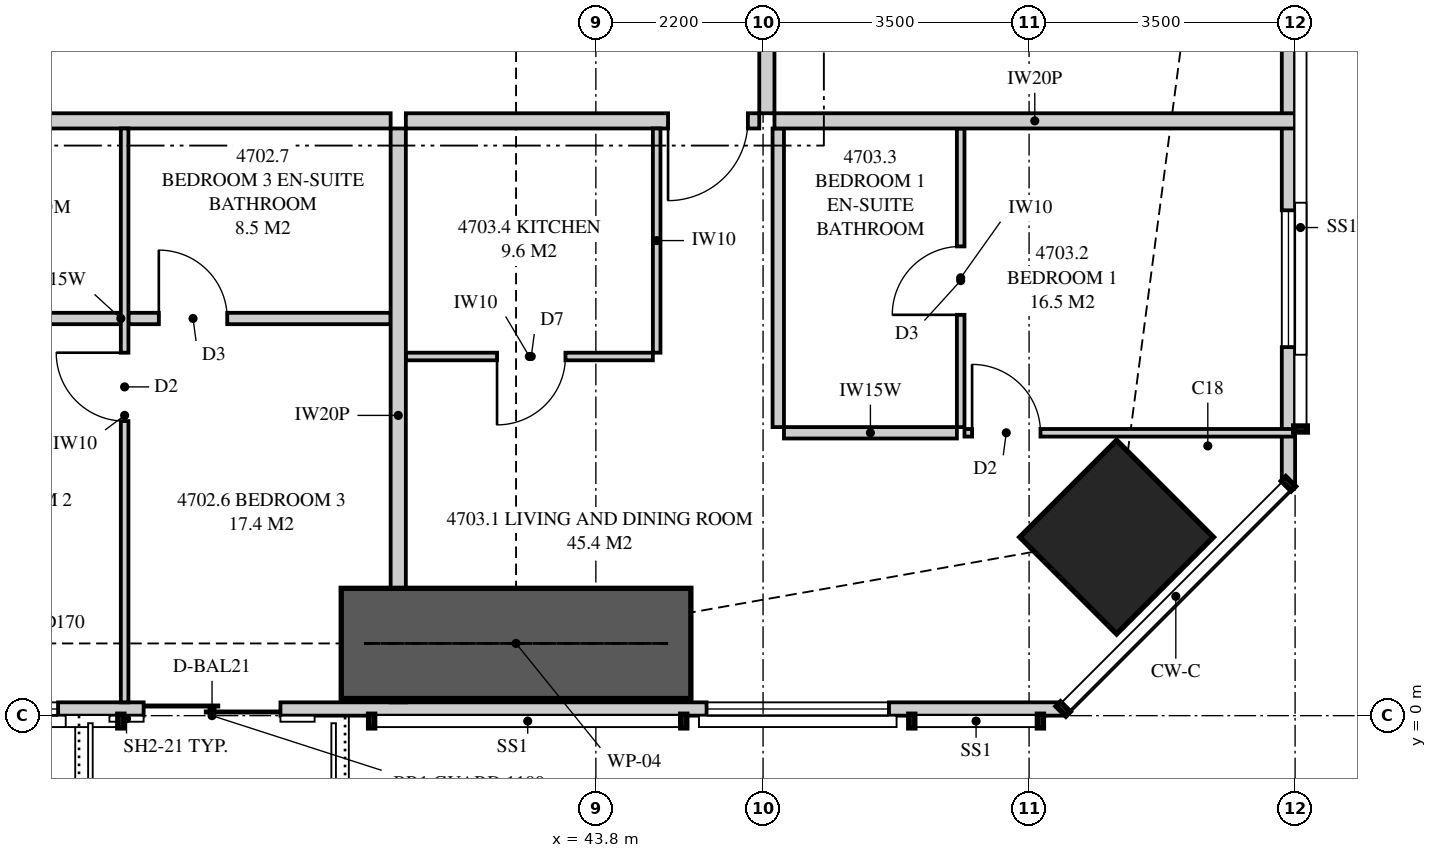
"""IFC4 building model, lengths in metres.
Left out: names, types, materials, properties, quantities, classifications, styles, units other than length and angle.
Written with IfcOpenShell. Run it as: python <this file> out.ifc"""

import sys

from ifc_helpers import new_model, si_unit, direction, frame, frame_2d, origin, origin_2d, place, context, subcontext, project, spatial, polyline, rectangle, outline, extrude, element, fill, save


model = new_model("IFC4")
c1 = context("Model", 3, precision=1e-05, world=origin(), true_north=direction((0.0, 1.0)))
c2 = subcontext(c1, "Body", "Model", "MODEL_VIEW")
j1 = project(units=[si_unit("LENGTHUNIT", "METRE"), si_unit("PLANEANGLEUNIT", "RADIAN")], contexts=[c1])
p1 = place(None, origin())
s1 = spatial("IfcSite", under=j1, at=p1, CompositionType="ELEMENT")
p2 = place(p1, origin())
s2 = spatial("IfcBuilding", under=s1, at=p2, CompositionType="ELEMENT")
p3 = place(p2, frame((0.0, 0.0, 174.45)))
s3 = spatial("IfcBuildingStorey", under=s2, at=p3, CompositionType="ELEMENT", Elevation=174.45)
p4 = place(p3, frame((50.652, 2.348, 0.0), z_axis=(0.0, 0.0, 1.0), x_axis=(0.707106781187, 0.707106781187, 0.0)))
e1 = element("IfcColumn", 1, at=p4, inside=s3, PredefinedType="COLUMN", context=c2, shape_type="SweptSolid", body=[
    extrude(rectangle(XDim=1.8, YDim=1.8, at=origin_2d()), origin(), (0.0, 0.0, 1.0), 3.35),
])
p5 = place(p3, frame((15.051, 0.087, 0.0), z_axis=(0.0, 0.0, 1.0), x_axis=(1.0, 0.0, 0.0)))
e2 = element("IfcWall", 2, at=p5, inside=s3, PredefinedType="SOLIDWALL", context=c2, shape_type="SweptSolid", body=[
    extrude(outline(polyline([(0.0, 0.0), (34.897, 0.0), (34.897, 3.11), (27.91, 3.11), (27.91, 2.15), (27.836, 2.15), (27.836, 3.11), (27.699, 3.11), (27.699, 2.15), (7.199, 2.15), (7.199, 3.11), (7.062, 3.11), (7.062, 2.15), (6.987, 2.15), (6.987, 3.11), (0.0, 3.11), (0.0, 0.0)])), frame((0.0, 0.087, 0.0), z_axis=(0.0, -1.0, 0.0), x_axis=(1.0, 0.0, 0.0)), (0.0, 0.0, 1.0), 0.175),
])
p6 = place(p5, frame((2.31, 0.0, 0.4)))
e3 = element("IfcOpeningElement", 3, at=p6, cuts=e2, PredefinedType="OPENING", context=c2, shape_type="SweptSolid", body=[
    extrude(rectangle(XDim=2.4, YDim=1.7, at=frame_2d((1.2, 0.85))), frame((0.0, 0.097, 0.0), z_axis=(0.0, -1.0, 0.0), x_axis=(1.0, 0.0, 0.0)), (0.0, 0.0, 1.0), 0.195),
])
p7 = place(p5, frame((10.399, 0.0, 0.0)))
e4 = element("IfcOpeningElement", 4, at=p7, cuts=e2, PredefinedType="OPENING", context=c2, shape_type="SweptSolid", body=[
    extrude(rectangle(XDim=1.8, YDim=2.1, at=frame_2d((0.9, 1.05))), frame((0.0, 0.097, 0.0), z_axis=(0.0, -1.0, 0.0), x_axis=(1.0, 0.0, 0.0)), (0.0, 0.0, 1.0), 0.195),
])
p8 = place(p5, frame((12.649, 0.0, 0.4)))
e5 = element("IfcOpeningElement", 5, at=p8, cuts=e2, PredefinedType="OPENING", context=c2, shape_type="SweptSolid", body=[
    extrude(rectangle(XDim=2.4, YDim=1.7, at=frame_2d((1.2, 0.85))), frame((0.0, 0.097, 0.0), z_axis=(0.0, -1.0, 0.0), x_axis=(1.0, 0.0, 0.0)), (0.0, 0.0, 1.0), 0.195),
])
p9 = place(p5, frame((19.874, 0.0, 0.4)))
e6 = element("IfcOpeningElement", 6, at=p9, cuts=e2, PredefinedType="OPENING", context=c2, shape_type="SweptSolid", body=[
    extrude(rectangle(XDim=1.8, YDim=1.7, at=frame_2d((0.9, 0.85))), frame((0.0, 0.097, 0.0), z_axis=(0.0, -1.0, 0.0), x_axis=(1.0, 0.0, 0.0)), (0.0, 0.0, 1.0), 0.195),
])
p10 = place(p5, frame((22.799, 0.0, 0.0)))
e7 = element("IfcOpeningElement", 7, at=p10, cuts=e2, PredefinedType="OPENING", context=c2, shape_type="SweptSolid", body=[
    extrude(rectangle(XDim=1.8, YDim=2.1, at=frame_2d((0.9, 1.05))), frame((0.0, 0.097, 0.0), z_axis=(0.0, -1.0, 0.0), x_axis=(1.0, 0.0, 0.0)), (0.0, 0.0, 1.0), 0.195),
])
p11 = place(p5, frame((30.205, 0.0, 0.4)))
e8 = element("IfcOpeningElement", 8, at=p11, cuts=e2, PredefinedType="OPENING", context=c2, shape_type="SweptSolid", body=[
    extrude(rectangle(XDim=2.4, YDim=1.7, at=frame_2d((1.2, 0.85))), frame((0.0, 0.097, 0.0), z_axis=(0.0, -1.0, 0.0), x_axis=(1.0, 0.0, 0.0)), (0.0, 0.0, 1.0), 0.195),
])
p12 = place(p3, frame((52.913, 3.051, 0.0), z_axis=(0.0, 0.0, 1.0), x_axis=(0.0, 1.0, 0.0)))
e9 = element("IfcWall", 9, at=p12, inside=s3, PredefinedType="SOLIDWALL", context=c2, shape_type="SweptSolid", body=[
    extrude(outline(polyline([(0.0, 0.0), (29.897, 0.0), (29.897, 3.11), (22.167, 3.11), (22.167, 2.15), (22.074, 2.15), (22.074, 3.11), (21.949, 3.11), (21.949, 2.15), (9.949, 2.15), (9.949, 3.11), (9.847, 3.11), (9.847, 2.15), (9.706, 2.15), (9.706, 3.11), (0.0, 3.11), (0.0, 0.0)])), frame((0.0, 0.087, 0.0), z_axis=(0.0, -1.0, 0.0), x_axis=(1.0, 0.0, 0.0)), (0.0, 0.0, 1.0), 0.175),
])
p13 = place(p12, frame((1.797, 0.0, 0.4)))
e10 = element("IfcOpeningElement", 10, at=p13, cuts=e9, PredefinedType="OPENING", context=c2, shape_type="SweptSolid", body=[
    extrude(rectangle(XDim=1.8, YDim=1.7, at=frame_2d((0.9, 0.85))), frame((0.0, 0.097, 0.0), z_axis=(0.0, -1.0, 0.0), x_axis=(1.0, 0.0, 0.0)), (0.0, 0.0, 1.0), 0.195),
])
p14 = place(p12, frame((6.321, 0.0, 0.4)))
e11 = element("IfcOpeningElement", 11, at=p14, cuts=e9, PredefinedType="OPENING", context=c2, shape_type="SweptSolid", body=[
    extrude(rectangle(XDim=1.2, YDim=1.7, at=frame_2d((0.6, 0.85))), frame((0.0, 0.097, 0.0), z_axis=(0.0, -1.0, 0.0), x_axis=(1.0, 0.0, 0.0)), (0.0, 0.0, 1.0), 0.195),
])
p15 = place(p12, frame((12.424, 0.0, 0.4)))
e12 = element("IfcOpeningElement", 12, at=p15, cuts=e9, PredefinedType="OPENING", context=c2, shape_type="SweptSolid", body=[
    extrude(rectangle(XDim=1.8, YDim=1.7, at=frame_2d((0.9, 0.85))), frame((0.0, 0.097, 0.0), z_axis=(0.0, -1.0, 0.0), x_axis=(1.0, 0.0, 0.0)), (0.0, 0.0, 1.0), 0.195),
])
p16 = place(p12, frame((15.274, 0.0, 0.0)))
e13 = element("IfcOpeningElement", 13, at=p16, cuts=e9, PredefinedType="OPENING", context=c2, shape_type="SweptSolid", body=[
    extrude(rectangle(XDim=1.8, YDim=2.1, at=frame_2d((0.9, 1.05))), frame((0.0, 0.097, 0.0), z_axis=(0.0, -1.0, 0.0), x_axis=(1.0, 0.0, 0.0)), (0.0, 0.0, 1.0), 0.195),
])
p17 = place(p12, frame((17.736, 0.0, 0.4)))
e14 = element("IfcOpeningElement", 14, at=p17, cuts=e9, PredefinedType="OPENING", context=c2, shape_type="SweptSolid", body=[
    extrude(rectangle(XDim=1.8, YDim=1.7, at=frame_2d((0.9, 0.85))), frame((0.0, 0.097, 0.0), z_axis=(0.0, -1.0, 0.0), x_axis=(1.0, 0.0, 0.0)), (0.0, 0.0, 1.0), 0.195),
])
p18 = place(p12, frame((24.373, 0.0, 0.4)))
e15 = element("IfcOpeningElement", 15, at=p18, cuts=e9, PredefinedType="OPENING", context=c2, shape_type="SweptSolid", body=[
    extrude(rectangle(XDim=1.2, YDim=1.7, at=frame_2d((0.6, 0.85))), frame((0.0, 0.097, 0.0), z_axis=(0.0, -1.0, 0.0), x_axis=(1.0, 0.0, 0.0)), (0.0, 0.0, 1.0), 0.195),
])
p19 = place(p12, frame((26.861, 0.0, 0.4)))
e16 = element("IfcOpeningElement", 16, at=p19, cuts=e9, PredefinedType="OPENING", context=c2, shape_type="SweptSolid", body=[
    extrude(rectangle(XDim=2.4, YDim=1.7, at=frame_2d((1.2, 0.85))), frame((0.0, 0.097, 0.0), z_axis=(0.0, -1.0, 0.0), x_axis=(1.0, 0.0, 0.0)), (0.0, 0.0, 1.0), 0.195),
])
p20 = place(p3, frame((41.2, 0.175, 0.0), z_axis=(0.0, 0.0, 1.0), x_axis=(0.0, 1.0, 0.0)))
e17 = element("IfcWall", 17, at=p20, inside=s3, PredefinedType="PARTITIONING", context=c2, shape_type="SweptSolid", body=[
    extrude(outline(polyline([(0.529, 2.15), (0.0, 2.15), (0.0, 0.0), (0.529, 0.0), (0.529, 0.248), (1.021, 0.248), (1.021, 0.0), (7.55, 0.0), (7.55, 3.11), (1.685, 3.11), (1.685, 2.15), (1.021, 2.15), (1.021, 1.902), (0.529, 1.902), (0.529, 2.15)])), frame((0.0, 0.1, 0.0), z_axis=(0.0, -1.0, 0.0), x_axis=(1.0, 0.0, 0.0)), (0.0, 0.0, 1.0), 0.2),
])
p21 = place(p3, frame((37.6, 0.175, 0.0), z_axis=(0.0, 0.0, 1.0), x_axis=(0.0, 1.0, 0.0)))
e18 = element("IfcWall", 18, at=p21, inside=s3, PredefinedType="PARTITIONING", context=c2, shape_type="SweptSolid", body=[
    extrude(outline(polyline([(0.0, 0.0), (7.55, 0.0), (7.55, 3.11), (1.635, 3.11), (1.635, 2.15), (0.0, 2.15), (0.0, 3.11), (0.0, 0.0)])), frame((0.0, 0.05, 0.0), z_axis=(0.0, -1.0, 0.0), x_axis=(1.0, 0.0, 0.0)), (0.0, 0.0, 1.0), 0.1),
])
p22 = place(p21, frame((3.7, 0.0, 0.0)))
e19 = element("IfcOpeningElement", 19, at=p22, cuts=e18, PredefinedType="OPENING", context=c2, shape_type="SweptSolid", body=[
    extrude(rectangle(XDim=0.9, YDim=2.1, at=frame_2d((0.45, 1.05))), frame((0.0, 0.06, 0.0), z_axis=(0.0, -1.0, 0.0), x_axis=(1.0, 0.0, 0.0)), (0.0, 0.0, 1.0), 0.12),
])
p23 = place(p3, frame((34.05, 5.225, 0.0), z_axis=(0.0, 0.0, 1.0), x_axis=(1.0, 0.0, 0.0)))
e20 = element("IfcWall", 20, at=p23, inside=s3, PredefinedType="PLUMBINGWALL", context=c2, shape_type="SweptSolid", body=[
    extrude(rectangle(XDim=3.5, YDim=0.15, at=frame_2d((1.75, 0.0))), origin(), (0.0, 0.0, 1.0), 3.11),
])
p24 = place(p3, frame((37.65, 5.225, 0.0), z_axis=(0.0, 0.0, 1.0), x_axis=(1.0, 0.0, 0.0)))
e21 = element("IfcWall", 21, at=p24, inside=s3, PredefinedType="PLUMBINGWALL", context=c2, shape_type="SweptSolid", body=[
    extrude(rectangle(XDim=3.45, YDim=0.15, at=frame_2d((1.725, 0.0))), origin(), (0.0, 0.0, 1.0), 3.11),
])
p25 = place(p24, frame((0.4, 0.0, 0.0)))
e22 = element("IfcOpeningElement", 22, at=p25, cuts=e21, PredefinedType="OPENING", context=c2, shape_type="SweptSolid", body=[
    extrude(rectangle(XDim=0.9, YDim=2.1, at=frame_2d((0.45, 1.05))), frame((0.0, 0.085, 0.0), z_axis=(0.0, -1.0, 0.0), x_axis=(1.0, 0.0, 0.0)), (0.0, 0.0, 1.0), 0.17),
])
p26 = place(p3, frame((41.3, 7.825, 0.0), z_axis=(0.0, 0.0, 1.0), x_axis=(1.0, 0.0, 0.0)))
e23 = element("IfcWall", 23, at=p26, inside=s3, PredefinedType="PARTITIONING", context=c2, shape_type="SweptSolid", body=[
    extrude(outline(polyline([(0.0, 0.0), (4.65, 0.0), (4.65, 3.11), (1.787, 3.11), (1.787, 2.541), (1.113, 2.541), (1.113, 3.11), (0.0, 3.11), (0.0, 0.0)])), frame((0.0, 0.1, 0.0), z_axis=(0.0, -1.0, 0.0), x_axis=(1.0, 0.0, 0.0)), (0.0, 0.0, 1.0), 0.2),
])
p27 = place(p26, frame((3.45, 0.0, 0.0)))
e24 = element("IfcOpeningElement", 24, at=p27, cuts=e23, PredefinedType="OPENING", context=c2, shape_type="SweptSolid", body=[
    extrude(rectangle(XDim=1.05, YDim=2.2, at=frame_2d((0.525, 1.1))), frame((0.0, 0.11, 0.0), z_axis=(0.0, -1.0, 0.0), x_axis=(1.0, 0.0, 0.0)), (0.0, 0.0, 1.0), 0.22),
])
p28 = place(p3, frame((48.6, 3.796, 0.0), z_axis=(0.0, 0.0, 1.0), x_axis=(0.0, 1.0, 0.0)))
e25 = element("IfcWall", 25, at=p28, inside=s3, PredefinedType="PARTITIONING", context=c2, shape_type="SweptSolid", body=[
    extrude(rectangle(XDim=3.929, YDim=0.1, at=frame_2d((1.964, 0.0))), origin(), (0.0, 0.0, 1.0), 3.11),
])
p29 = place(p28, frame((1.477, 0.0, 0.0)))
e26 = element("IfcOpeningElement", 26, at=p29, cuts=e25, PredefinedType="OPENING", context=c2, shape_type="SweptSolid", body=[
    extrude(rectangle(XDim=0.9, YDim=2.1, at=frame_2d((0.45, 1.05))), frame((0.0, 0.06, 0.0), z_axis=(0.0, -1.0, 0.0), x_axis=(1.0, 0.0, 0.0)), (0.0, 0.0, 1.0), 0.12),
])
p30 = place(p3, frame((48.65, 3.721, 0.0), z_axis=(0.0, 0.0, 1.0), x_axis=(1.0, 0.0, 0.0)))
e27 = element("IfcWall", 27, at=p30, inside=s3, PredefinedType="PARTITIONING", context=c2, shape_type="SweptSolid", body=[
    extrude(outline(polyline([(0.0, 0.0), (4.35, 0.0), (4.35, 3.11), (3.049, 3.11), (3.049, 2.15), (1.314, 2.15), (1.314, 3.11), (0.0, 3.11), (0.0, 0.0)])), frame((0.0, 0.05, 0.0), z_axis=(0.0, -1.0, 0.0), x_axis=(1.0, 0.0, 0.0)), (0.0, 0.0, 1.0), 0.1),
])
p31 = place(p30, frame((0.1, 0.0, 0.0)))
e28 = element("IfcOpeningElement", 28, at=p31, cuts=e27, PredefinedType="OPENING", context=c2, shape_type="SweptSolid", body=[
    extrude(rectangle(XDim=0.9, YDim=2.1, at=frame_2d((0.45, 1.05))), frame((0.0, 0.06, 0.0), z_axis=(0.0, -1.0, 0.0), x_axis=(1.0, 0.0, 0.0)), (0.0, 0.0, 1.0), 0.12),
])
p32 = place(p3, frame((46.275, 3.721, 0.0), z_axis=(0.0, 0.0, 1.0), x_axis=(1.0, 0.0, 0.0)))
e29 = element("IfcWall", 29, at=p32, inside=s3, PredefinedType="PLUMBINGWALL", context=c2, shape_type="SweptSolid", body=[
    extrude(rectangle(XDim=2.275, YDim=0.15, at=frame_2d((1.138, 0.0))), origin(), (0.0, 0.0, 1.0), 3.11),
])
p33 = place(p3, frame((46.2, 3.796, 0.0), z_axis=(0.0, 0.0, 1.0), x_axis=(0.0, 1.0, 0.0)))
e30 = element("IfcWall", 30, at=p33, inside=s3, PredefinedType="PLUMBINGWALL", context=c2, shape_type="SweptSolid", body=[
    extrude(rectangle(XDim=3.929, YDim=0.15, at=frame_2d((1.964, 0.0))), origin(), (0.0, 0.0, 1.0), 3.11),
])
p34 = place(p3, frame((41.3, 4.725, 0.0), z_axis=(0.0, 0.0, 1.0), x_axis=(1.0, 0.0, 0.0)))
e31 = element("IfcWall", 31, at=p34, inside=s3, PredefinedType="PARTITIONING", context=c2, shape_type="SweptSolid", body=[
    extrude(outline(polyline([(0.0, 0.0), (3.25, 0.0), (3.25, 3.11), (1.737, 3.11), (1.737, 2.541), (1.163, 2.541), (1.163, 3.11), (0.0, 3.11), (0.0, 0.0)])), frame((0.0, 0.05, 0.0), z_axis=(0.0, -1.0, 0.0), x_axis=(1.0, 0.0, 0.0)), (0.0, 0.0, 1.0), 0.1),
])
p35 = place(p34, frame((1.2, 0.0, 0.0)))
e32 = element("IfcOpeningElement", 32, at=p35, cuts=e31, PredefinedType="OPENING", context=c2, shape_type="SweptSolid", body=[
    extrude(rectangle(XDim=0.9, YDim=2.1, at=frame_2d((0.45, 1.05))), frame((0.0, 0.06, 0.0), z_axis=(0.0, -1.0, 0.0), x_axis=(1.0, 0.0, 0.0)), (0.0, 0.0, 1.0), 0.12),
])
p36 = place(p3, frame((44.6, 4.775, 0.0), z_axis=(0.0, 0.0, 1.0), x_axis=(0.0, 1.0, 0.0)))
e33 = element("IfcWall", 33, at=p36, inside=s3, PredefinedType="PARTITIONING", context=c2, shape_type="SweptSolid", body=[
    extrude(rectangle(XDim=2.95, YDim=0.1, at=frame_2d((1.475, 0.0))), origin(), (0.0, 0.0, 1.0), 3.11),
])
p37 = place(p3, frame((46.15, 7.825, 0.0), z_axis=(0.0, 0.0, 1.0), x_axis=(1.0, 0.0, 0.0)))
e34 = element("IfcWall", 34, at=p37, inside=s3, PredefinedType="PARTITIONING", context=c2, shape_type="SweptSolid", body=[
    extrude(outline(polyline([(0.0, 0.0), (6.85, 0.0), (6.85, 3.11), (6.138, 3.11), (6.138, 2.15), (4.303, 2.15), (4.303, 3.11), (0.0, 3.11), (0.0, 0.0)])), frame((0.0, 0.1, 0.0), z_axis=(0.0, -1.0, 0.0), x_axis=(1.0, 0.0, 0.0)), (0.0, 0.0, 1.0), 0.2),
])
p38 = place(p3, frame((46.05, 7.925, 0.0), z_axis=(0.0, 0.0, 1.0), x_axis=(0.0, 1.0, 0.0)))
e35 = element("IfcWall", 35, at=p38, inside=s3, PredefinedType="PARTITIONING", context=c2, shape_type="SweptSolid", body=[
    extrude(rectangle(XDim=1.188, YDim=0.2, at=frame_2d((0.594, 0.0))), origin(), (0.0, 0.0, 1.0), 3.11),
])
p39 = place(p3, frame((33.725, 7.825, 0.0), z_axis=(0.0, 0.0, 1.0), x_axis=(1.0, 0.0, 0.0)))
e36 = element("IfcWall", 36, at=p39, inside=s3, PredefinedType="PARTITIONING", context=c2, shape_type="SweptSolid", body=[
    extrude(rectangle(XDim=7.375, YDim=0.2, at=frame_2d((3.688, 0.0))), origin(), (0.0, 0.0, 1.0), 3.11),
])
p40 = place(p3, frame((40.45, 0.95, 0.0), z_axis=(0.0, 0.0, 1.0), x_axis=(1.0, 0.0, 0.0)))
e37 = element("IfcWall", 37, at=p40, inside=s3, PredefinedType="SHEAR", context=c2, shape_type="SweptSolid", body=[
    extrude(rectangle(XDim=4.6, YDim=1.45, at=frame_2d((2.3, 0.0))), origin(), (0.0, 0.0, 1.0), 3.35),
])
p41 = place(p9, origin())
e38 = element("IfcWindow", 38, at=p41, inside=s3, PartitioningType="SINGLE_PANEL", PredefinedType="WINDOW", context=c2, shape_type="SweptSolid", body=[
    extrude(rectangle(XDim=1.8, YDim=1.7, at=frame_2d((0.9, 0.85))), frame((0.0, 0.03, 0.0), z_axis=(0.0, -1.0, 0.0), x_axis=(1.0, 0.0, 0.0)), (0.0, 0.0, 1.0), 0.06),
])
fill(e6, e38)
p42 = place(p10, origin())
e39 = element("IfcDoor", 39, at=p42, inside=s3, OperationType="SLIDING_TO_LEFT", PredefinedType="DOOR", context=c2, shape_type="SweptSolid", body=[
    extrude(rectangle(XDim=1.8, YDim=2.1, at=frame_2d((0.9, 1.05))), frame((0.0, 0.025, 0.0), z_axis=(0.0, -1.0, 0.0), x_axis=(1.0, 0.0, 0.0)), (0.0, 0.0, 1.0), 0.05),
])
fill(e7, e39)
p43 = place(p11, origin())
e40 = element("IfcWindow", 40, at=p43, inside=s3, PartitioningType="SINGLE_PANEL", PredefinedType="WINDOW", context=c2, shape_type="SweptSolid", body=[
    extrude(rectangle(XDim=2.4, YDim=1.7, at=frame_2d((1.2, 0.85))), frame((0.0, 0.03, 0.0), z_axis=(0.0, -1.0, 0.0), x_axis=(1.0, 0.0, 0.0)), (0.0, 0.0, 1.0), 0.06),
])
fill(e8, e40)
p44 = place(p13, origin())
e41 = element("IfcWindow", 41, at=p44, inside=s3, PartitioningType="SINGLE_PANEL", PredefinedType="WINDOW", context=c2, shape_type="SweptSolid", body=[
    extrude(rectangle(XDim=1.8, YDim=1.7, at=frame_2d((0.9, 0.85))), frame((0.0, 0.03, 0.0), z_axis=(0.0, -1.0, 0.0), x_axis=(1.0, 0.0, 0.0)), (0.0, 0.0, 1.0), 0.06),
])
fill(e10, e41)
p45 = place(p22, origin())
e42 = element("IfcDoor", 42, at=p45, inside=s3, OperationType="SINGLE_SWING_RIGHT", PredefinedType="DOOR", context=c2, shape_type="SweptSolid", body=[
    extrude(rectangle(XDim=0.9, YDim=2.1, at=frame_2d((0.45, 1.05))), frame((0.0, 0.025, 0.0), z_axis=(0.0, -1.0, 0.0), x_axis=(1.0, 0.0, 0.0)), (0.0, 0.0, 1.0), 0.05),
])
fill(e19, e42)
p46 = place(p25, origin())
e43 = element("IfcDoor", 43, at=p46, inside=s3, OperationType="SINGLE_SWING_LEFT", PredefinedType="DOOR", context=c2, shape_type="SweptSolid", body=[
    extrude(rectangle(XDim=0.9, YDim=2.1, at=frame_2d((0.45, 1.05))), frame((0.0, 0.025, 0.0), z_axis=(0.0, -1.0, 0.0), x_axis=(1.0, 0.0, 0.0)), (0.0, 0.0, 1.0), 0.05),
])
fill(e22, e43)
p47 = place(p27, frame((1.05, 0.0, 0.0), z_axis=(0.0, 0.0, 1.0), x_axis=(-1.0, 0.0, 0.0)))
e44 = element("IfcDoor", 44, at=p47, inside=s3, OperationType="SINGLE_SWING_RIGHT", PredefinedType="DOOR", context=c2, shape_type="SweptSolid", body=[
    extrude(rectangle(XDim=1.05, YDim=2.2, at=frame_2d((0.525, 1.1))), frame((0.0, 0.025, 0.0), z_axis=(0.0, -1.0, 0.0), x_axis=(1.0, 0.0, 0.0)), (0.0, 0.0, 1.0), 0.05),
])
fill(e24, e44)
p48 = place(p31, origin())
e45 = element("IfcDoor", 45, at=p48, inside=s3, OperationType="SINGLE_SWING_LEFT", PredefinedType="DOOR", context=c2, shape_type="SweptSolid", body=[
    extrude(rectangle(XDim=0.9, YDim=2.1, at=frame_2d((0.45, 1.05))), frame((0.0, 0.025, 0.0), z_axis=(0.0, -1.0, 0.0), x_axis=(1.0, 0.0, 0.0)), (0.0, 0.0, 1.0), 0.05),
])
fill(e28, e45)
p49 = place(p29, origin())
e46 = element("IfcDoor", 46, at=p49, inside=s3, OperationType="SINGLE_SWING_LEFT", PredefinedType="DOOR", context=c2, shape_type="SweptSolid", body=[
    extrude(rectangle(XDim=0.9, YDim=2.1, at=frame_2d((0.45, 1.05))), frame((0.0, 0.025, 0.0), z_axis=(0.0, -1.0, 0.0), x_axis=(1.0, 0.0, 0.0)), (0.0, 0.0, 1.0), 0.05),
])
fill(e26, e46)
p50 = place(p35, frame((0.9, 0.0, 0.0), z_axis=(0.0, 0.0, 1.0), x_axis=(-1.0, 0.0, 0.0)))
e47 = element("IfcDoor", 47, at=p50, inside=s3, OperationType="SINGLE_SWING_RIGHT", PredefinedType="DOOR", context=c2, shape_type="SweptSolid", body=[
    extrude(rectangle(XDim=0.9, YDim=2.1, at=frame_2d((0.45, 1.05))), frame((0.0, 0.025, 0.0), z_axis=(0.0, -1.0, 0.0), x_axis=(1.0, 0.0, 0.0)), (0.0, 0.0, 1.0), 0.05),
])
fill(e32, e47)
save(model, sys.argv[1])
